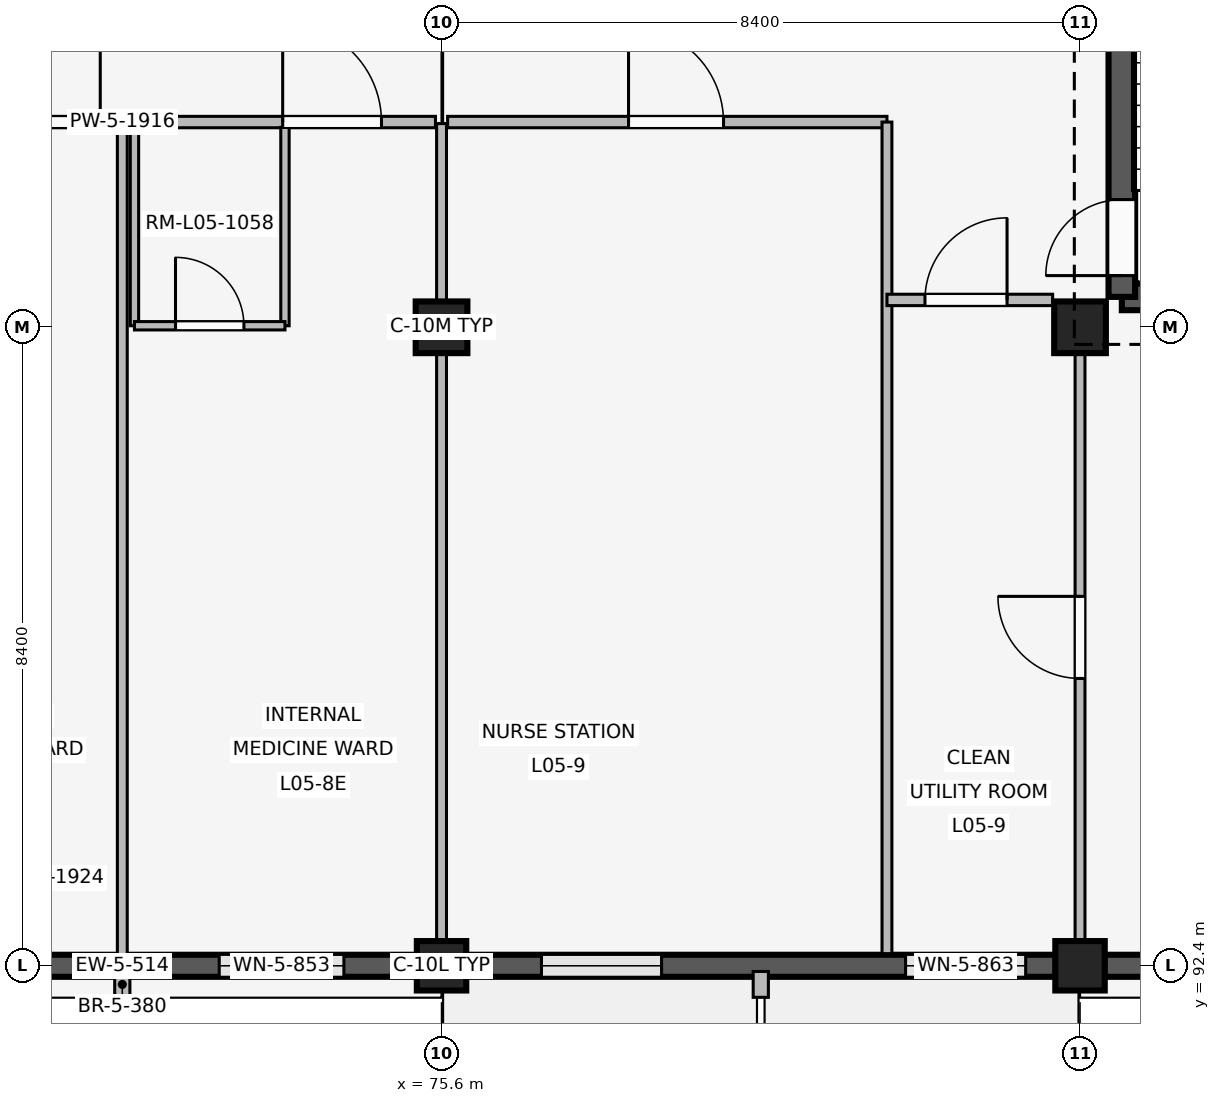
"""IFC4 building model, lengths in metres.
Left out: names, types, materials, properties, quantities, classifications, styles, units other than length and angle.
Written with IfcOpenShell. Run it as: python <this file> out.ifc"""

import sys

from ifc_helpers import new_model, si_unit, direction, frame, frame_2d, origin, origin_2d, place, context, subcontext, project, spatial, rectangle, extrude, element, fill, save


model = new_model("IFC4")
c1 = context("Model", 3, precision=1e-05, world=origin(), true_north=direction((0.0, 1.0)))
c2 = subcontext(c1, "Body", "Model", "MODEL_VIEW")
j1 = project(units=[si_unit("LENGTHUNIT", "METRE"), si_unit("PLANEANGLEUNIT", "RADIAN")], contexts=[c1])
p1 = place(None, origin())
s1 = spatial("IfcSite", under=j1, at=p1, CompositionType="ELEMENT")
p2 = place(p1, origin())
s2 = spatial("IfcBuilding", under=s1, at=p2, CompositionType="ELEMENT")
p3 = place(p2, frame((0.0, 0.0, 20.4)))
s3 = spatial("IfcBuildingStorey", under=s2, at=p3, CompositionType="ELEMENT", Elevation=20.4)
p4 = place(p3, frame((75.6, 92.4, 0.0), z_axis=(0.0, 0.0, 1.0), x_axis=(1.0, 0.0, 0.0)))
e1 = element("IfcColumn", 1, at=p4, inside=s3, PredefinedType="COLUMN", context=c2, shape_type="SweptSolid", body=[
    extrude(rectangle(XDim=0.65, YDim=0.65, at=origin_2d()), origin(), (0.0, 0.0, 1.0), 4.2),
])
p5 = place(p3, frame((75.6, 100.8, 0.0), z_axis=(0.0, 0.0, 1.0), x_axis=(1.0, 0.0, 0.0)))
e2 = element("IfcColumn", 2, at=p5, inside=s3, PredefinedType="COLUMN", context=c2, shape_type="SweptSolid", body=[
    extrude(rectangle(XDim=0.68, YDim=0.68, at=origin_2d()), origin(), (0.0, 0.0, 1.0), 4.2),
])
p6 = place(p3, frame((84.0, 92.4, 0.0), z_axis=(0.0, 0.0, 1.0), x_axis=(1.0, 0.0, 0.0)))
e3 = element("IfcColumn", 3, at=p6, inside=s3, PredefinedType="COLUMN", context=c2, shape_type="SweptSolid", body=[
    extrude(rectangle(XDim=0.65, YDim=0.65, at=origin_2d()), origin(), (0.0, 0.0, 1.0), 4.2),
])
p7 = place(p3, frame((84.0, 100.8, 0.0), z_axis=(0.0, 0.0, 1.0), x_axis=(1.0, 0.0, 0.0)))
e4 = element("IfcColumn", 4, at=p7, inside=s3, PredefinedType="COLUMN", context=c2, shape_type="SweptSolid", body=[
    extrude(rectangle(XDim=0.68, YDim=0.68, at=origin_2d()), origin(), (0.0, 0.0, 1.0), 4.2),
])
p8 = place(p3, frame((75.28, 92.4, 0.0), z_axis=(0.0, 0.0, 1.0), x_axis=(-1.0, 0.0, 0.0)))
e5 = element("IfcWall", 5, at=p8, inside=s3, PredefinedType="SOLIDWALL", context=c2, shape_type="SweptSolid", body=[
    extrude(rectangle(XDim=7.76, YDim=0.29, at=frame_2d((3.88, 0.0))), origin(), (0.0, 0.0, 1.0), 3.34),
])
p9 = place(p8, frame((0.965, 0.0, 0.85)))
e6 = element("IfcOpeningElement", 6, at=p9, cuts=e5, PredefinedType="OPENING", context=c2, shape_type="SweptSolid", body=[
    extrude(rectangle(XDim=1.64, YDim=1.75, at=frame_2d((0.82, 0.875))), frame((0.0, 0.155, 0.0), z_axis=(0.0, -1.0, 0.0), x_axis=(1.0, 0.0, 0.0)), (0.0, 0.0, 1.0), 0.31),
])
p10 = place(p8, frame((5.155, 0.0, 0.85)))
e7 = element("IfcOpeningElement", 7, at=p10, cuts=e5, PredefinedType="OPENING", context=c2, shape_type="SweptSolid", body=[
    extrude(rectangle(XDim=1.64, YDim=1.75, at=frame_2d((0.82, 0.875))), frame((0.0, 0.155, 0.0), z_axis=(0.0, -1.0, 0.0), x_axis=(1.0, 0.0, 0.0)), (0.0, 0.0, 1.0), 0.31),
])
p11 = place(p3, frame((71.4, 92.325, 0.0), z_axis=(0.0, 0.0, 1.0), x_axis=(0.0, -1.0, 0.0)))
e8 = element("IfcWall", 8, at=p11, inside=s3, PredefinedType="ELEMENTEDWALL", context=c2, shape_type="SweptSolid", body=[
    extrude(rectangle(XDim=0.34, YDim=0.2, at=frame_2d((0.17, 0.0))), origin(), (0.0, 0.0, 1.0), 3.32),
])
p12 = place(p3, frame((83.68, 92.4, 0.0), z_axis=(0.0, 0.0, 1.0), x_axis=(-1.0, 0.0, 0.0)))
e9 = element("IfcWall", 9, at=p12, inside=s3, PredefinedType="SOLIDWALL", context=c2, shape_type="SweptSolid", body=[
    extrude(rectangle(XDim=7.76, YDim=0.29, at=frame_2d((3.88, 0.0))), origin(), (0.0, 0.0, 1.0), 3.34),
])
p13 = place(p12, frame((0.395, 0.0, 0.85)))
e10 = element("IfcOpeningElement", 10, at=p13, cuts=e9, PredefinedType="OPENING", context=c2, shape_type="SweptSolid", body=[
    extrude(rectangle(XDim=1.58, YDim=1.7, at=frame_2d((0.79, 0.85))), frame((0.0, 0.155, 0.0), z_axis=(0.0, -1.0, 0.0), x_axis=(1.0, 0.0, 0.0)), (0.0, 0.0, 1.0), 0.31),
])
p14 = place(p12, frame((5.185, 0.0, 0.85)))
e11 = element("IfcOpeningElement", 11, at=p14, cuts=e9, PredefinedType="OPENING", context=c2, shape_type="SweptSolid", body=[
    extrude(rectangle(XDim=1.58, YDim=1.7, at=frame_2d((0.79, 0.85))), frame((0.0, 0.155, 0.0), z_axis=(0.0, -1.0, 0.0), x_axis=(1.0, 0.0, 0.0)), (0.0, 0.0, 1.0), 0.31),
])
p15 = place(p3, frame((79.8, 92.325, 0.0), z_axis=(0.0, 0.0, 1.0), x_axis=(0.0, -1.0, 0.0)))
e12 = element("IfcWall", 12, at=p15, inside=s3, PredefinedType="ELEMENTEDWALL", context=c2, shape_type="SweptSolid", body=[
    extrude(rectangle(XDim=0.34, YDim=0.2, at=frame_2d((0.17, 0.0))), origin(), (0.0, 0.0, 1.0), 3.32),
])
p16 = place(p3, frame((92.08, 92.4, 0.0), z_axis=(0.0, 0.0, 1.0), x_axis=(-1.0, 0.0, 0.0)))
e13 = element("IfcWall", 13, at=p16, inside=s3, PredefinedType="SOLIDWALL", context=c2, shape_type="SweptSolid", body=[
    extrude(rectangle(XDim=7.76, YDim=0.29, at=frame_2d((3.88, 0.0))), origin(), (0.0, 0.0, 1.0), 3.34),
])
p17 = place(p16, frame((1.045, 0.0, 0.85)))
e14 = element("IfcOpeningElement", 14, at=p17, cuts=e13, PredefinedType="OPENING", context=c2, shape_type="SweptSolid", body=[
    extrude(rectangle(XDim=1.48, YDim=1.6, at=frame_2d((0.74, 0.8))), frame((0.0, 0.155, 0.0), z_axis=(0.0, -1.0, 0.0), x_axis=(1.0, 0.0, 0.0)), (0.0, 0.0, 1.0), 0.31),
])
p18 = place(p16, frame((5.235, 0.0, 0.85)))
e15 = element("IfcOpeningElement", 15, at=p18, cuts=e13, PredefinedType="OPENING", context=c2, shape_type="SweptSolid", body=[
    extrude(rectangle(XDim=1.48, YDim=1.6, at=frame_2d((0.74, 0.8))), frame((0.0, 0.155, 0.0), z_axis=(0.0, -1.0, 0.0), x_axis=(1.0, 0.0, 0.0)), (0.0, 0.0, 1.0), 0.31),
])
p19 = place(p3, frame((84.55, 101.2, 0.0), z_axis=(0.0, 0.0, 1.0), x_axis=(1.0, 0.0, 0.0)))
e16 = element("IfcWall", 16, at=p19, inside=s3, PredefinedType="SHEAR", context=c2, shape_type="SweptSolid", body=[
    extrude(rectangle(XDim=7.5, YDim=0.35, at=frame_2d((3.75, 0.0))), origin(), (0.0, 0.0, 1.0), 3.92),
])
p20 = place(p19, frame((4.85, 0.0, 0.0)))
e17 = element("IfcOpeningElement", 17, at=p20, cuts=e16, PredefinedType="OPENING", context=c2, shape_type="SweptSolid", body=[
    extrude(rectangle(XDim=1.2, YDim=2.2, at=frame_2d((0.6, 1.1))), frame((0.0, 0.185, 0.0), z_axis=(0.0, -1.0, 0.0), x_axis=(1.0, 0.0, 0.0)), (0.0, 0.0, 1.0), 0.37),
])
p21 = place(p3, frame((84.55, 101.2, 0.0), z_axis=(0.0, 0.0, 1.0), x_axis=(0.0, 1.0, 0.0)))
e18 = element("IfcWall", 18, at=p21, inside=s3, PredefinedType="SHEAR", context=c2, shape_type="SweptSolid", body=[
    extrude(rectangle(XDim=7.55, YDim=0.35, at=frame_2d((3.775, 0.0))), origin(), (0.0, 0.0, 1.0), 3.92),
])
p22 = place(p21, frame((0.28, 0.0, 0.0)))
e19 = element("IfcOpeningElement", 19, at=p22, cuts=e18, PredefinedType="OPENING", context=c2, shape_type="SweptSolid", body=[
    extrude(rectangle(XDim=1.0, YDim=2.15, at=frame_2d((0.5, 1.075))), frame((0.0, 0.185, 0.0), z_axis=(0.0, -1.0, 0.0), x_axis=(1.0, 0.0, 0.0)), (0.0, 0.0, 1.0), 0.37),
])
p23 = place(p3, frame((67.28, 103.5, 0.0), z_axis=(0.0, 0.0, 1.0), x_axis=(1.0, 0.0, 0.0)))
e20 = element("IfcWall", 20, at=p23, inside=s3, PredefinedType="PARTITIONING", context=c2, shape_type="SweptSolid", body=[
    extrude(rectangle(XDim=8.24, YDim=0.15, at=frame_2d((4.12, 0.0))), origin(), (0.0, 0.0, 1.0), 3.32),
])
p24 = place(p23, frame((2.53, 0.0, 0.0)))
e21 = element("IfcOpeningElement", 21, at=p24, cuts=e20, PredefinedType="OPENING", context=c2, shape_type="SweptSolid", body=[
    extrude(rectangle(XDim=1.3, YDim=2.25, at=frame_2d((0.65, 1.125))), frame((0.0, 0.085, 0.0), z_axis=(0.0, -1.0, 0.0), x_axis=(1.0, 0.0, 0.0)), (0.0, 0.0, 1.0), 0.17),
])
p25 = place(p23, frame((6.23, 0.0, 0.0)))
e22 = element("IfcOpeningElement", 22, at=p25, cuts=e20, PredefinedType="OPENING", context=c2, shape_type="SweptSolid", body=[
    extrude(rectangle(XDim=1.3, YDim=2.25, at=frame_2d((0.65, 1.125))), frame((0.0, 0.085, 0.0), z_axis=(0.0, -1.0, 0.0), x_axis=(1.0, 0.0, 0.0)), (0.0, 0.0, 1.0), 0.17),
])
p26 = place(p3, frame((71.4, 92.5, 0.0), z_axis=(0.0, 0.0, 1.0), x_axis=(0.0, 1.0, 0.0)))
e23 = element("IfcWall", 23, at=p26, inside=s3, PredefinedType="PARTITIONING", context=c2, shape_type="SweptSolid", body=[
    extrude(rectangle(XDim=10.93, YDim=0.13, at=frame_2d((5.465, 0.0))), origin(), (0.0, 0.0, 1.0), 3.32),
])
for number, where, z_axis, x_axis in (
    (24, (71.56, 100.82, 0.0), (0.0, 0.0, 1.0), (0.0, 1.0, 0.0)),
    (25, (73.54, 100.82, 0.0), (0.0, 0.0, 1.0), (0.0, 1.0, 0.0)),
):
    element("IfcWall", number, at=place(p3, frame(where, z_axis=z_axis, x_axis=x_axis)), inside=s3, PredefinedType="PARTITIONING", context=c2, shape_type="SweptSolid", body=[
        extrude(rectangle(XDim=2.61, YDim=0.11, at=frame_2d((1.305, 0.0))), origin(), (0.0, 0.0, 1.0), 3.32),
    ])
p27 = place(p3, frame((71.56, 100.82, 0.0), z_axis=(0.0, 0.0, 1.0), x_axis=(1.0, 0.0, 0.0)))
e26 = element("IfcWall", 26, at=p27, inside=s3, PredefinedType="PARTITIONING", context=c2, shape_type="SweptSolid", body=[
    extrude(rectangle(XDim=1.98, YDim=0.11, at=frame_2d((0.99, 0.0))), origin(), (0.0, 0.0, 1.0), 3.32),
])
p28 = place(p27, frame((0.54, 0.0, 0.0)))
e27 = element("IfcOpeningElement", 27, at=p28, cuts=e26, PredefinedType="OPENING", context=c2, shape_type="SweptSolid", body=[
    extrude(rectangle(XDim=0.9, YDim=2.1, at=frame_2d((0.45, 1.05))), frame((0.0, 0.065, 0.0), z_axis=(0.0, -1.0, 0.0), x_axis=(1.0, 0.0, 0.0)), (0.0, 0.0, 1.0), 0.13),
])
p29 = place(p3, frame((70.05, 93.55, 0.0), z_axis=(0.0, 0.0, 1.0), x_axis=(1.0, 0.0, 0.0)))
e28 = element("IfcWall", 28, at=p29, inside=s3, PredefinedType="PLUMBINGWALL", context=c2, shape_type="SweptSolid", body=[
    extrude(rectangle(XDim=0.9, YDim=0.24, at=frame_2d((0.45, 0.0))), origin(), (0.0, 0.0, 1.0), 3.32),
])
p30 = place(p3, frame((75.6, 92.54, 0.0), z_axis=(0.0, 0.0, 1.0), x_axis=(0.0, 1.0, 0.0)))
e29 = element("IfcWall", 29, at=p30, inside=s3, PredefinedType="PARTITIONING", context=c2, shape_type="SweptSolid", body=[
    extrude(rectangle(XDim=10.94, YDim=0.13, at=frame_2d((5.47, 0.0))), origin(), (0.0, 0.0, 1.0), 3.32),
])
p31 = place(p3, frame((75.68, 103.5, 0.0), z_axis=(0.0, 0.0, 1.0), x_axis=(1.0, 0.0, 0.0)))
e30 = element("IfcWall", 30, at=p31, inside=s3, PredefinedType="PARTITIONING", context=c2, shape_type="SweptSolid", body=[
    extrude(rectangle(XDim=5.78, YDim=0.15, at=frame_2d((2.89, 0.0))), origin(), (0.0, 0.0, 1.0), 3.32),
])
p32 = place(p31, frame((2.38, 0.0, 0.0)))
e31 = element("IfcOpeningElement", 31, at=p32, cuts=e30, PredefinedType="OPENING", context=c2, shape_type="SweptSolid", body=[
    extrude(rectangle(XDim=1.25, YDim=2.2, at=frame_2d((0.625, 1.1))), frame((0.0, 0.085, 0.0), z_axis=(0.0, -1.0, 0.0), x_axis=(1.0, 0.0, 0.0)), (0.0, 0.0, 1.0), 0.17),
])
p33 = place(p3, frame((81.46, 92.56, 0.0), z_axis=(0.0, 0.0, 1.0), x_axis=(0.0, 1.0, 0.0)))
e32 = element("IfcWall", 32, at=p33, inside=s3, PredefinedType="PARTITIONING", context=c2, shape_type="SweptSolid", body=[
    extrude(rectangle(XDim=10.94, YDim=0.13, at=frame_2d((5.47, 0.0))), origin(), (0.0, 0.0, 1.0), 3.32),
])
p34 = place(p3, frame((81.46, 101.16, 0.0), z_axis=(0.0, 0.0, 1.0), x_axis=(1.0, 0.0, 0.0)))
e33 = element("IfcWall", 33, at=p34, inside=s3, PredefinedType="PARTITIONING", context=c2, shape_type="SweptSolid", body=[
    extrude(rectangle(XDim=2.18, YDim=0.15, at=frame_2d((1.09, 0.0))), origin(), (0.0, 0.0, 1.0), 3.32),
])
p35 = place(p34, frame((0.5, 0.0, 0.0)))
e34 = element("IfcOpeningElement", 34, at=p35, cuts=e33, PredefinedType="OPENING", context=c2, shape_type="SweptSolid", body=[
    extrude(rectangle(XDim=1.08, YDim=2.15, at=frame_2d((0.54, 1.075))), frame((0.0, 0.085, 0.0), z_axis=(0.0, -1.0, 0.0), x_axis=(1.0, 0.0, 0.0)), (0.0, 0.0, 1.0), 0.17),
])
p36 = place(p3, frame((84.0, 92.54, 0.0), z_axis=(0.0, 0.0, 1.0), x_axis=(0.0, 1.0, 0.0)))
e35 = element("IfcWall", 35, at=p36, inside=s3, PredefinedType="PARTITIONING", context=c2, shape_type="SweptSolid", body=[
    extrude(rectangle(XDim=8.21, YDim=0.13, at=frame_2d((4.105, 0.0))), origin(), (0.0, 0.0, 1.0), 3.32),
])
p37 = place(p36, frame((3.64, 0.0, 0.0)))
e36 = element("IfcOpeningElement", 36, at=p37, cuts=e35, PredefinedType="OPENING", context=c2, shape_type="SweptSolid", body=[
    extrude(rectangle(XDim=1.08, YDim=2.15, at=frame_2d((0.54, 1.075))), frame((0.0, 0.075, 0.0), z_axis=(0.0, -1.0, 0.0), x_axis=(1.0, 0.0, 0.0)), (0.0, 0.0, 1.0), 0.15),
])
p38 = place(p9, origin())
e37 = element("IfcWindow", 37, at=p38, inside=s3, PartitioningType="SINGLE_PANEL", PredefinedType="WINDOW", context=c2, shape_type="SweptSolid", body=[
    extrude(rectangle(XDim=1.64, YDim=1.75, at=frame_2d((0.82, 0.875))), frame((0.0, 0.03, 0.0), z_axis=(0.0, -1.0, 0.0), x_axis=(1.0, 0.0, 0.0)), (0.0, 0.0, 1.0), 0.06),
])
fill(e6, e37)
p39 = place(p13, origin())
e38 = element("IfcWindow", 38, at=p39, inside=s3, PartitioningType="SINGLE_PANEL", PredefinedType="WINDOW", context=c2, shape_type="SweptSolid", body=[
    extrude(rectangle(XDim=1.58, YDim=1.7, at=frame_2d((0.79, 0.85))), frame((0.0, 0.03, 0.0), z_axis=(0.0, -1.0, 0.0), x_axis=(1.0, 0.0, 0.0)), (0.0, 0.0, 1.0), 0.06),
])
fill(e10, e38)
p40 = place(p14, origin())
e39 = element("IfcWindow", 39, at=p40, inside=s3, PartitioningType="SINGLE_PANEL", PredefinedType="WINDOW", context=c2, shape_type="SweptSolid", body=[
    extrude(rectangle(XDim=1.58, YDim=1.7, at=frame_2d((0.79, 0.85))), frame((0.0, 0.03, 0.0), z_axis=(0.0, -1.0, 0.0), x_axis=(1.0, 0.0, 0.0)), (0.0, 0.0, 1.0), 0.06),
])
fill(e11, e39)
p41 = place(p22, origin())
e40 = element("IfcDoor", 40, at=p41, inside=s3, OperationType="SINGLE_SWING_LEFT", PredefinedType="DOOR", context=c2, shape_type="SweptSolid", body=[
    extrude(rectangle(XDim=1.0, YDim=2.15, at=frame_2d((0.5, 1.075))), frame((0.0, 0.025, 0.0), z_axis=(0.0, -1.0, 0.0), x_axis=(1.0, 0.0, 0.0)), (0.0, 0.0, 1.0), 0.05),
])
fill(e19, e40)
p42 = place(p24, origin())
e41 = element("IfcDoor", 41, at=p42, inside=s3, OperationType="SINGLE_SWING_RIGHT", PredefinedType="DOOR", context=c2, shape_type="SweptSolid", body=[
    extrude(rectangle(XDim=1.3, YDim=2.25, at=frame_2d((0.65, 1.125))), frame((0.0, 0.025, 0.0), z_axis=(0.0, -1.0, 0.0), x_axis=(1.0, 0.0, 0.0)), (0.0, 0.0, 1.0), 0.05),
])
fill(e21, e41)
p43 = place(p25, origin())
e42 = element("IfcDoor", 42, at=p43, inside=s3, OperationType="SINGLE_SWING_LEFT", PredefinedType="DOOR", context=c2, shape_type="SweptSolid", body=[
    extrude(rectangle(XDim=1.3, YDim=2.25, at=frame_2d((0.65, 1.125))), frame((0.0, 0.025, 0.0), z_axis=(0.0, -1.0, 0.0), x_axis=(1.0, 0.0, 0.0)), (0.0, 0.0, 1.0), 0.05),
])
fill(e22, e42)
p44 = place(p28, origin())
e43 = element("IfcDoor", 43, at=p44, inside=s3, OperationType="SINGLE_SWING_LEFT", PredefinedType="DOOR", context=c2, shape_type="SweptSolid", body=[
    extrude(rectangle(XDim=0.9, YDim=2.1, at=frame_2d((0.45, 1.05))), frame((0.0, 0.025, 0.0), z_axis=(0.0, -1.0, 0.0), x_axis=(1.0, 0.0, 0.0)), (0.0, 0.0, 1.0), 0.05),
])
fill(e27, e43)
p45 = place(p32, origin())
e44 = element("IfcDoor", 44, at=p45, inside=s3, OperationType="SINGLE_SWING_LEFT", PredefinedType="DOOR", context=c2, shape_type="SweptSolid", body=[
    extrude(rectangle(XDim=1.25, YDim=2.2, at=frame_2d((0.625, 1.1))), frame((0.0, 0.025, 0.0), z_axis=(0.0, -1.0, 0.0), x_axis=(1.0, 0.0, 0.0)), (0.0, 0.0, 1.0), 0.05),
])
fill(e31, e44)
p46 = place(p35, origin())
e45 = element("IfcDoor", 45, at=p46, inside=s3, OperationType="SINGLE_SWING_RIGHT", PredefinedType="DOOR", context=c2, shape_type="SweptSolid", body=[
    extrude(rectangle(XDim=1.08, YDim=2.15, at=frame_2d((0.54, 1.075))), frame((0.0, 0.025, 0.0), z_axis=(0.0, -1.0, 0.0), x_axis=(1.0, 0.0, 0.0)), (0.0, 0.0, 1.0), 0.05),
])
fill(e34, e45)
p47 = place(p37, origin())
e46 = element("IfcDoor", 46, at=p47, inside=s3, OperationType="SINGLE_SWING_RIGHT", PredefinedType="DOOR", context=c2, shape_type="SweptSolid", body=[
    extrude(rectangle(XDim=1.08, YDim=2.15, at=frame_2d((0.54, 1.075))), frame((0.0, 0.025, 0.0), z_axis=(0.0, -1.0, 0.0), x_axis=(1.0, 0.0, 0.0)), (0.0, 0.0, 1.0), 0.05),
])
fill(e36, e46)
save(model, sys.argv[1])
